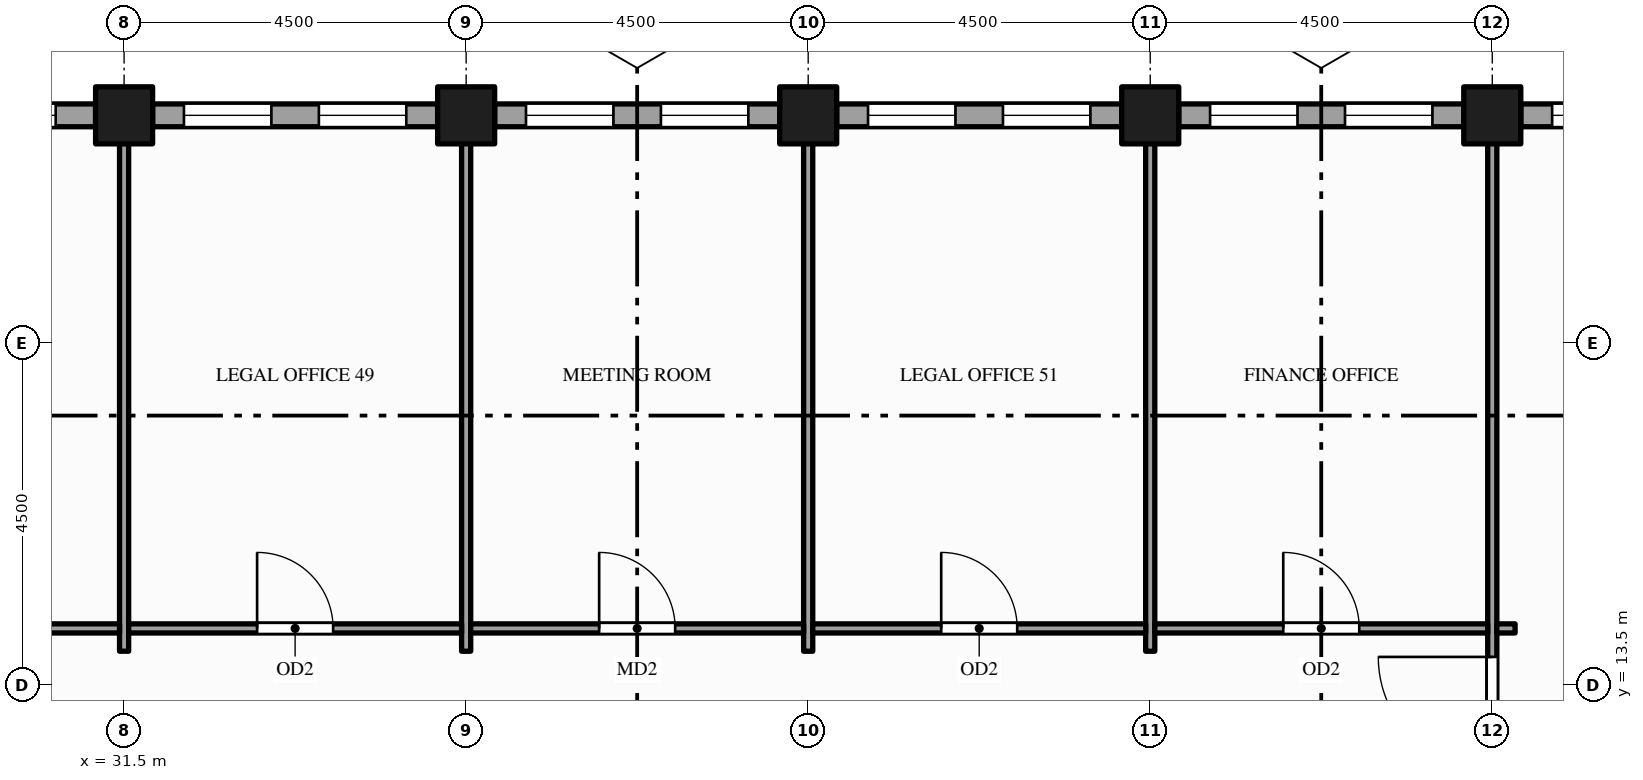
"""IFC4 building model, lengths in metres.
Left out: names, types, materials, properties, quantities, classifications, styles, units other than length and angle.
Written with IfcOpenShell. Run it as: python <this file> out.ifc"""

import sys

from ifc_helpers import new_model, si_unit, direction, frame, frame_2d, origin, origin_2d, place, context, subcontext, project, spatial, rectangle, hollow_rectangle, extrude, element, fill, save


model = new_model("IFC4")
c1 = context("Model", 3, precision=1e-05, world=origin(), true_north=direction((0.0, 1.0)))
c2 = subcontext(c1, "Body", "Model", "MODEL_VIEW")
j1 = project(units=[si_unit("LENGTHUNIT", "METRE"), si_unit("PLANEANGLEUNIT", "RADIAN")], contexts=[c1])
p1 = place(None, origin())
s1 = spatial("IfcSite", under=j1, at=p1, CompositionType="ELEMENT")
p2 = place(p1, origin())
s2 = spatial("IfcBuilding", under=s1, at=p2, CompositionType="ELEMENT")
p3 = place(p2, frame((0.0, 0.0, 239.0)))
s3 = spatial("IfcBuildingStorey", under=s2, at=p3, CompositionType="ELEMENT", Elevation=239.0)
for number, where, z_axis, x_axis in (
    (1, (31.5, 21.0, -0.15), (0.0, 0.0, 1.0), (1.0, 0.0, 0.0)),
    (2, (36.0, 21.0, -0.15), (0.0, 0.0, 1.0), (1.0, 0.0, 0.0)),
    (3, (40.5, 21.0, -0.15), (0.0, 0.0, 1.0), (1.0, 0.0, 0.0)),
    (4, (45.0, 21.0, -0.15), (0.0, 0.0, 1.0), (1.0, 0.0, 0.0)),
    (5, (49.5, 21.0, -0.15), (0.0, 0.0, 1.0), (1.0, 0.0, 0.0)),
):
    element("IfcColumn", number, at=place(p3, frame(where, z_axis=z_axis, x_axis=x_axis)), inside=s3, PredefinedType="COLUMN", context=c2, shape_type="SweptSolid", body=[
        extrude(hollow_rectangle(XDim=0.75, YDim=0.75, WallThickness=0.036, at=origin_2d()), origin(), (0.0, 0.0, 1.0), 3.9),
    ])
p4 = place(p3, frame((54.0, 21.0, 0.0), z_axis=(0.0, 0.0, 1.0), x_axis=(-1.0, 0.0, 0.0)))
e6 = element("IfcWall", 6, at=p4, inside=s3, PredefinedType="STANDARD", context=c2, shape_type="SweptSolid", body=[
    extrude(rectangle(XDim=4.125, YDim=0.3, at=frame_2d((2.062, 0.0))), origin(), (0.0, 0.0, 1.0), 2.77),
])
p5 = place(p4, frame((0.4, 0.0, 0.9)))
e7 = element("IfcOpeningElement", 7, at=p5, cuts=e6, PredefinedType="OPENING", context=c2, shape_type="SweptSolid", body=[
    extrude(rectangle(XDim=1.55, YDim=1.5, at=frame_2d((0.775, 0.75))), frame((0.0, 0.16, 0.0), z_axis=(0.0, -1.0, 0.0), x_axis=(1.0, 0.0, 0.0)), (0.0, 0.0, 1.0), 0.32),
])
p6 = place(p4, frame((2.562, 0.0, 0.9)))
e8 = element("IfcOpeningElement", 8, at=p6, cuts=e6, PredefinedType="OPENING", context=c2, shape_type="SweptSolid", body=[
    extrude(rectangle(XDim=1.15, YDim=1.5, at=frame_2d((0.575, 0.75))), frame((0.0, 0.16, 0.0), z_axis=(0.0, -1.0, 0.0), x_axis=(1.0, 0.0, 0.0)), (0.0, 0.0, 1.0), 0.32),
])
p7 = place(p3, frame((49.125, 21.0, 0.0), z_axis=(0.0, 0.0, 1.0), x_axis=(-1.0, 0.0, 0.0)))
e9 = element("IfcWall", 9, at=p7, inside=s3, PredefinedType="STANDARD", context=c2, shape_type="SweptSolid", body=[
    extrude(rectangle(XDim=3.75, YDim=0.3, at=frame_2d((1.875, 0.0))), origin(), (0.0, 0.0, 1.0), 2.77),
])
p8 = place(p7, frame((0.413, 0.0, 0.9)))
e10 = element("IfcOpeningElement", 10, at=p8, cuts=e9, PredefinedType="OPENING", context=c2, shape_type="SweptSolid", body=[
    extrude(rectangle(XDim=1.15, YDim=1.5, at=frame_2d((0.575, 0.75))), frame((0.0, 0.16, 0.0), z_axis=(0.0, -1.0, 0.0), x_axis=(1.0, 0.0, 0.0)), (0.0, 0.0, 1.0), 0.32),
])
p9 = place(p7, frame((2.188, 0.0, 0.9)))
e11 = element("IfcOpeningElement", 11, at=p9, cuts=e9, PredefinedType="OPENING", context=c2, shape_type="SweptSolid", body=[
    extrude(rectangle(XDim=1.15, YDim=1.5, at=frame_2d((0.575, 0.75))), frame((0.0, 0.16, 0.0), z_axis=(0.0, -1.0, 0.0), x_axis=(1.0, 0.0, 0.0)), (0.0, 0.0, 1.0), 0.32),
])
p10 = place(p3, frame((44.625, 21.0, 0.0), z_axis=(0.0, 0.0, 1.0), x_axis=(-1.0, 0.0, 0.0)))
e12 = element("IfcWall", 12, at=p10, inside=s3, PredefinedType="STANDARD", context=c2, shape_type="SweptSolid", body=[
    extrude(rectangle(XDim=3.75, YDim=0.3, at=frame_2d((1.875, 0.0))), origin(), (0.0, 0.0, 1.0), 2.77),
])
p11 = place(p10, frame((0.413, 0.0, 0.9)))
e13 = element("IfcOpeningElement", 13, at=p11, cuts=e12, PredefinedType="OPENING", context=c2, shape_type="SweptSolid", body=[
    extrude(rectangle(XDim=1.15, YDim=1.5, at=frame_2d((0.575, 0.75))), frame((0.0, 0.16, 0.0), z_axis=(0.0, -1.0, 0.0), x_axis=(1.0, 0.0, 0.0)), (0.0, 0.0, 1.0), 0.32),
])
p12 = place(p10, frame((2.188, 0.0, 0.9)))
e14 = element("IfcOpeningElement", 14, at=p12, cuts=e12, PredefinedType="OPENING", context=c2, shape_type="SweptSolid", body=[
    extrude(rectangle(XDim=1.15, YDim=1.5, at=frame_2d((0.575, 0.75))), frame((0.0, 0.16, 0.0), z_axis=(0.0, -1.0, 0.0), x_axis=(1.0, 0.0, 0.0)), (0.0, 0.0, 1.0), 0.32),
])
p13 = place(p3, frame((40.125, 21.0, 0.0), z_axis=(0.0, 0.0, 1.0), x_axis=(-1.0, 0.0, 0.0)))
e15 = element("IfcWall", 15, at=p13, inside=s3, PredefinedType="STANDARD", context=c2, shape_type="SweptSolid", body=[
    extrude(rectangle(XDim=3.75, YDim=0.3, at=frame_2d((1.875, 0.0))), origin(), (0.0, 0.0, 1.0), 2.77),
])
p14 = place(p13, frame((0.413, 0.0, 0.9)))
e16 = element("IfcOpeningElement", 16, at=p14, cuts=e15, PredefinedType="OPENING", context=c2, shape_type="SweptSolid", body=[
    extrude(rectangle(XDim=1.15, YDim=1.5, at=frame_2d((0.575, 0.75))), frame((0.0, 0.16, 0.0), z_axis=(0.0, -1.0, 0.0), x_axis=(1.0, 0.0, 0.0)), (0.0, 0.0, 1.0), 0.32),
])
p15 = place(p13, frame((2.188, 0.0, 0.9)))
e17 = element("IfcOpeningElement", 17, at=p15, cuts=e15, PredefinedType="OPENING", context=c2, shape_type="SweptSolid", body=[
    extrude(rectangle(XDim=1.15, YDim=1.5, at=frame_2d((0.575, 0.75))), frame((0.0, 0.16, 0.0), z_axis=(0.0, -1.0, 0.0), x_axis=(1.0, 0.0, 0.0)), (0.0, 0.0, 1.0), 0.32),
])
p16 = place(p3, frame((35.625, 21.0, 0.0), z_axis=(0.0, 0.0, 1.0), x_axis=(-1.0, 0.0, 0.0)))
e18 = element("IfcWall", 18, at=p16, inside=s3, PredefinedType="STANDARD", context=c2, shape_type="SweptSolid", body=[
    extrude(rectangle(XDim=3.75, YDim=0.3, at=frame_2d((1.875, 0.0))), origin(), (0.0, 0.0, 1.0), 2.77),
])
p17 = place(p16, frame((0.413, 0.0, 0.9)))
e19 = element("IfcOpeningElement", 19, at=p17, cuts=e18, PredefinedType="OPENING", context=c2, shape_type="SweptSolid", body=[
    extrude(rectangle(XDim=1.15, YDim=1.5, at=frame_2d((0.575, 0.75))), frame((0.0, 0.16, 0.0), z_axis=(0.0, -1.0, 0.0), x_axis=(1.0, 0.0, 0.0)), (0.0, 0.0, 1.0), 0.32),
])
p18 = place(p16, frame((2.188, 0.0, 0.9)))
e20 = element("IfcOpeningElement", 20, at=p18, cuts=e18, PredefinedType="OPENING", context=c2, shape_type="SweptSolid", body=[
    extrude(rectangle(XDim=1.15, YDim=1.5, at=frame_2d((0.575, 0.75))), frame((0.0, 0.16, 0.0), z_axis=(0.0, -1.0, 0.0), x_axis=(1.0, 0.0, 0.0)), (0.0, 0.0, 1.0), 0.32),
])
p19 = place(p3, frame((31.125, 21.0, 0.0), z_axis=(0.0, 0.0, 1.0), x_axis=(-1.0, 0.0, 0.0)))
e21 = element("IfcWall", 21, at=p19, inside=s3, PredefinedType="STANDARD", context=c2, shape_type="SweptSolid", body=[
    extrude(rectangle(XDim=2.25, YDim=0.3, at=frame_2d((1.125, 0.0))), origin(), (0.0, 0.0, 1.0), 2.77),
])
p20 = place(p19, frame((0.525, 0.0, 0.9)))
e22 = element("IfcOpeningElement", 22, at=p20, cuts=e21, PredefinedType="OPENING", context=c2, shape_type="SweptSolid", body=[
    extrude(rectangle(XDim=1.2, YDim=1.5, at=frame_2d((0.6, 0.75))), frame((0.0, 0.16, 0.0), z_axis=(0.0, -1.0, 0.0), x_axis=(1.0, 0.0, 0.0)), (0.0, 0.0, 1.0), 0.32),
])
for number, where, z_axis, x_axis in (
    (23, (31.5, 13.95, 0.0), (0.0, 0.0, 1.0), (0.0, 1.0, 0.0)),
    (24, (36.0, 13.95, 0.0), (0.0, 0.0, 1.0), (0.0, 1.0, 0.0)),
    (25, (40.5, 13.95, 0.0), (0.0, 0.0, 1.0), (0.0, 1.0, 0.0)),
    (26, (45.0, 13.95, 0.0), (0.0, 0.0, 1.0), (0.0, 1.0, 0.0)),
):
    element("IfcWall", number, at=place(p3, frame(where, z_axis=z_axis, x_axis=x_axis)), inside=s3, PredefinedType="PARTITIONING", context=c2, shape_type="SweptSolid", body=[
        extrude(rectangle(XDim=6.9, YDim=0.12, at=frame_2d((3.45, 0.0))), origin(), (0.0, 0.0, 1.0), 2.77),
    ])
p21 = place(p3, frame((49.5, -1.35, 0.0), z_axis=(0.0, 0.0, 1.0), x_axis=(0.0, 1.0, 0.0)))
e27 = element("IfcWall", 27, at=p21, inside=s3, PredefinedType="PARTITIONING", context=c2, shape_type="SweptSolid", body=[
    extrude(rectangle(XDim=22.2, YDim=0.12, at=frame_2d((11.1, 0.0))), origin(), (0.0, 0.0, 1.0), 2.3),
])
p22 = place(p21, frame((6.975, 0.0, 0.0)))
e28 = element("IfcOpeningElement", 28, at=p22, cuts=e27, PredefinedType="OPENING", context=c2, shape_type="SweptSolid", body=[
    extrude(rectangle(XDim=1.5, YDim=2.1, at=frame_2d((0.75, 1.05))), frame((0.0, 0.07, 0.0), z_axis=(0.0, -1.0, 0.0), x_axis=(1.0, 0.0, 0.0)), (0.0, 0.0, 1.0), 0.14),
])
p23 = place(p21, frame((13.725, 0.0, 0.0)))
e29 = element("IfcOpeningElement", 29, at=p23, cuts=e27, PredefinedType="OPENING", context=c2, shape_type="SweptSolid", body=[
    extrude(rectangle(XDim=1.5, YDim=2.1, at=frame_2d((0.75, 1.05))), frame((0.0, 0.07, 0.0), z_axis=(0.0, -1.0, 0.0), x_axis=(1.0, 0.0, 0.0)), (0.0, 0.0, 1.0), 0.14),
])
p24 = place(p21, frame((9.29, 0.0, 0.0)))
e30 = element("IfcOpeningElement", 30, at=p24, cuts=e27, PredefinedType="OPENING", context=c2, shape_type="SweptSolid", body=[
    extrude(rectangle(XDim=0.9, YDim=2.1, at=frame_2d((0.45, 1.05))), frame((0.0, 0.07, 0.0), z_axis=(0.0, -1.0, 0.0), x_axis=(1.0, 0.0, 0.0)), (0.0, 0.0, 1.0), 0.14),
])
p25 = place(p21, frame((10.65, 0.0, 0.0)))
e31 = element("IfcOpeningElement", 31, at=p25, cuts=e27, PredefinedType="OPENING", context=c2, shape_type="SweptSolid", body=[
    extrude(rectangle(XDim=0.9, YDim=2.1, at=frame_2d((0.45, 1.05))), frame((0.0, 0.07, 0.0), z_axis=(0.0, -1.0, 0.0), x_axis=(1.0, 0.0, 0.0)), (0.0, 0.0, 1.0), 0.14),
])
p26 = place(p21, frame((12.01, 0.0, 0.0)))
e32 = element("IfcOpeningElement", 32, at=p26, cuts=e27, PredefinedType="OPENING", context=c2, shape_type="SweptSolid", body=[
    extrude(rectangle(XDim=1.0, YDim=2.1, at=frame_2d((0.5, 1.05))), frame((0.0, 0.07, 0.0), z_axis=(0.0, -1.0, 0.0), x_axis=(1.0, 0.0, 0.0)), (0.0, 0.0, 1.0), 0.14),
])
p27 = place(p3, frame((27.06, 14.25, 0.0), z_axis=(0.0, 0.0, 1.0), x_axis=(1.0, 0.0, 0.0)))
e33 = element("IfcWall", 33, at=p27, inside=s3, PredefinedType="PARTITIONING", context=c2, shape_type="SweptSolid", body=[
    extrude(rectangle(XDim=4.38, YDim=0.12, at=frame_2d((2.19, 0.0))), origin(), (0.0, 0.0, 1.0), 2.77),
])
p28 = place(p27, frame((1.69, 0.0, 0.0)))
e34 = element("IfcOpeningElement", 34, at=p28, cuts=e33, PredefinedType="OPENING", context=c2, shape_type="SweptSolid", body=[
    extrude(rectangle(XDim=1.0, YDim=2.1, at=frame_2d((0.5, 1.05))), frame((0.0, 0.07, 0.0), z_axis=(0.0, -1.0, 0.0), x_axis=(1.0, 0.0, 0.0)), (0.0, 0.0, 1.0), 0.14),
])
p29 = place(p3, frame((31.56, 14.25, 0.0), z_axis=(0.0, 0.0, 1.0), x_axis=(1.0, 0.0, 0.0)))
e35 = element("IfcWall", 35, at=p29, inside=s3, PredefinedType="PARTITIONING", context=c2, shape_type="SweptSolid", body=[
    extrude(rectangle(XDim=4.38, YDim=0.12, at=frame_2d((2.19, 0.0))), origin(), (0.0, 0.0, 1.0), 2.77),
])
p30 = place(p29, frame((1.69, 0.0, 0.0)))
e36 = element("IfcOpeningElement", 36, at=p30, cuts=e35, PredefinedType="OPENING", context=c2, shape_type="SweptSolid", body=[
    extrude(rectangle(XDim=1.0, YDim=2.1, at=frame_2d((0.5, 1.05))), frame((0.0, 0.07, 0.0), z_axis=(0.0, -1.0, 0.0), x_axis=(1.0, 0.0, 0.0)), (0.0, 0.0, 1.0), 0.14),
])
p31 = place(p3, frame((36.06, 14.25, 0.0), z_axis=(0.0, 0.0, 1.0), x_axis=(1.0, 0.0, 0.0)))
e37 = element("IfcWall", 37, at=p31, inside=s3, PredefinedType="PARTITIONING", context=c2, shape_type="SweptSolid", body=[
    extrude(rectangle(XDim=4.38, YDim=0.12, at=frame_2d((2.19, 0.0))), origin(), (0.0, 0.0, 1.0), 2.77),
])
p32 = place(p31, frame((1.69, 0.0, 0.0)))
e38 = element("IfcOpeningElement", 38, at=p32, cuts=e37, PredefinedType="OPENING", context=c2, shape_type="SweptSolid", body=[
    extrude(rectangle(XDim=1.0, YDim=2.1, at=frame_2d((0.5, 1.05))), frame((0.0, 0.07, 0.0), z_axis=(0.0, -1.0, 0.0), x_axis=(1.0, 0.0, 0.0)), (0.0, 0.0, 1.0), 0.14),
])
p33 = place(p3, frame((40.56, 14.25, 0.0), z_axis=(0.0, 0.0, 1.0), x_axis=(1.0, 0.0, 0.0)))
e39 = element("IfcWall", 39, at=p33, inside=s3, PredefinedType="PARTITIONING", context=c2, shape_type="SweptSolid", body=[
    extrude(rectangle(XDim=4.38, YDim=0.12, at=frame_2d((2.19, 0.0))), origin(), (0.0, 0.0, 1.0), 2.77),
])
p34 = place(p33, frame((1.69, 0.0, 0.0)))
e40 = element("IfcOpeningElement", 40, at=p34, cuts=e39, PredefinedType="OPENING", context=c2, shape_type="SweptSolid", body=[
    extrude(rectangle(XDim=1.0, YDim=2.1, at=frame_2d((0.5, 1.05))), frame((0.0, 0.07, 0.0), z_axis=(0.0, -1.0, 0.0), x_axis=(1.0, 0.0, 0.0)), (0.0, 0.0, 1.0), 0.14),
])
p35 = place(p3, frame((45.06, 14.25, 0.0), z_axis=(0.0, 0.0, 1.0), x_axis=(1.0, 0.0, 0.0)))
e41 = element("IfcWall", 41, at=p35, inside=s3, PredefinedType="PARTITIONING", context=c2, shape_type="SweptSolid", body=[
    extrude(rectangle(XDim=4.38, YDim=0.12, at=frame_2d((2.19, 0.0))), origin(), (0.0, 0.0, 1.0), 2.77),
])
p36 = place(p35, frame((1.69, 0.0, 0.0)))
e42 = element("IfcOpeningElement", 42, at=p36, cuts=e41, PredefinedType="OPENING", context=c2, shape_type="SweptSolid", body=[
    extrude(rectangle(XDim=1.0, YDim=2.1, at=frame_2d((0.5, 1.05))), frame((0.0, 0.07, 0.0), z_axis=(0.0, -1.0, 0.0), x_axis=(1.0, 0.0, 0.0)), (0.0, 0.0, 1.0), 0.14),
])
p37 = place(p3, frame((49.56, 14.25, 0.0), z_axis=(0.0, 0.0, 1.0), x_axis=(1.0, 0.0, 0.0)))
e43 = element("IfcWall", 43, at=p37, inside=s3, PredefinedType="PARTITIONING", context=c2, shape_type="SweptSolid", body=[
    extrude(rectangle(XDim=0.24, YDim=0.12, at=frame_2d((0.12, 0.0))), origin(), (0.0, 0.0, 1.0), 2.77),
])
p38 = place(p6, origin())
e44 = element("IfcWindow", 44, at=p38, inside=s3, PartitioningType="SINGLE_PANEL", PredefinedType="WINDOW", context=c2, shape_type="SweptSolid", body=[
    extrude(rectangle(XDim=1.15, YDim=1.5, at=frame_2d((0.575, 0.75))), frame((0.0, 0.03, 0.0), z_axis=(0.0, -1.0, 0.0), x_axis=(1.0, 0.0, 0.0)), (0.0, 0.0, 1.0), 0.06),
])
fill(e8, e44)
p39 = place(p8, origin())
e45 = element("IfcWindow", 45, at=p39, inside=s3, PartitioningType="SINGLE_PANEL", PredefinedType="WINDOW", context=c2, shape_type="SweptSolid", body=[
    extrude(rectangle(XDim=1.15, YDim=1.5, at=frame_2d((0.575, 0.75))), frame((0.0, 0.03, 0.0), z_axis=(0.0, -1.0, 0.0), x_axis=(1.0, 0.0, 0.0)), (0.0, 0.0, 1.0), 0.06),
])
fill(e10, e45)
p40 = place(p9, origin())
e46 = element("IfcWindow", 46, at=p40, inside=s3, PartitioningType="SINGLE_PANEL", PredefinedType="WINDOW", context=c2, shape_type="SweptSolid", body=[
    extrude(rectangle(XDim=1.15, YDim=1.5, at=frame_2d((0.575, 0.75))), frame((0.0, 0.03, 0.0), z_axis=(0.0, -1.0, 0.0), x_axis=(1.0, 0.0, 0.0)), (0.0, 0.0, 1.0), 0.06),
])
fill(e11, e46)
p41 = place(p11, origin())
e47 = element("IfcWindow", 47, at=p41, inside=s3, PartitioningType="SINGLE_PANEL", PredefinedType="WINDOW", context=c2, shape_type="SweptSolid", body=[
    extrude(rectangle(XDim=1.15, YDim=1.5, at=frame_2d((0.575, 0.75))), frame((0.0, 0.03, 0.0), z_axis=(0.0, -1.0, 0.0), x_axis=(1.0, 0.0, 0.0)), (0.0, 0.0, 1.0), 0.06),
])
fill(e13, e47)
p42 = place(p12, origin())
e48 = element("IfcWindow", 48, at=p42, inside=s3, PartitioningType="SINGLE_PANEL", PredefinedType="WINDOW", context=c2, shape_type="SweptSolid", body=[
    extrude(rectangle(XDim=1.15, YDim=1.5, at=frame_2d((0.575, 0.75))), frame((0.0, 0.03, 0.0), z_axis=(0.0, -1.0, 0.0), x_axis=(1.0, 0.0, 0.0)), (0.0, 0.0, 1.0), 0.06),
])
fill(e14, e48)
p43 = place(p14, origin())
e49 = element("IfcWindow", 49, at=p43, inside=s3, PartitioningType="SINGLE_PANEL", PredefinedType="WINDOW", context=c2, shape_type="SweptSolid", body=[
    extrude(rectangle(XDim=1.15, YDim=1.5, at=frame_2d((0.575, 0.75))), frame((0.0, 0.03, 0.0), z_axis=(0.0, -1.0, 0.0), x_axis=(1.0, 0.0, 0.0)), (0.0, 0.0, 1.0), 0.06),
])
fill(e16, e49)
p44 = place(p15, origin())
e50 = element("IfcWindow", 50, at=p44, inside=s3, PartitioningType="SINGLE_PANEL", PredefinedType="WINDOW", context=c2, shape_type="SweptSolid", body=[
    extrude(rectangle(XDim=1.15, YDim=1.5, at=frame_2d((0.575, 0.75))), frame((0.0, 0.03, 0.0), z_axis=(0.0, -1.0, 0.0), x_axis=(1.0, 0.0, 0.0)), (0.0, 0.0, 1.0), 0.06),
])
fill(e17, e50)
p45 = place(p17, origin())
e51 = element("IfcWindow", 51, at=p45, inside=s3, PartitioningType="SINGLE_PANEL", PredefinedType="WINDOW", context=c2, shape_type="SweptSolid", body=[
    extrude(rectangle(XDim=1.15, YDim=1.5, at=frame_2d((0.575, 0.75))), frame((0.0, 0.03, 0.0), z_axis=(0.0, -1.0, 0.0), x_axis=(1.0, 0.0, 0.0)), (0.0, 0.0, 1.0), 0.06),
])
fill(e19, e51)
p46 = place(p18, origin())
e52 = element("IfcWindow", 52, at=p46, inside=s3, PartitioningType="SINGLE_PANEL", PredefinedType="WINDOW", context=c2, shape_type="SweptSolid", body=[
    extrude(rectangle(XDim=1.15, YDim=1.5, at=frame_2d((0.575, 0.75))), frame((0.0, 0.03, 0.0), z_axis=(0.0, -1.0, 0.0), x_axis=(1.0, 0.0, 0.0)), (0.0, 0.0, 1.0), 0.06),
])
fill(e20, e52)
p47 = place(p20, origin())
e53 = element("IfcWindow", 53, at=p47, inside=s3, PartitioningType="SINGLE_PANEL", PredefinedType="WINDOW", context=c2, shape_type="SweptSolid", body=[
    extrude(rectangle(XDim=1.2, YDim=1.5, at=frame_2d((0.6, 0.75))), frame((0.0, 0.03, 0.0), z_axis=(0.0, -1.0, 0.0), x_axis=(1.0, 0.0, 0.0)), (0.0, 0.0, 1.0), 0.06),
])
fill(e22, e53)
p48 = place(p23, origin())
e54 = element("IfcDoor", 54, at=p48, inside=s3, OperationType="SINGLE_SWING_RIGHT", PredefinedType="DOOR", context=c2, shape_type="SweptSolid", body=[
    extrude(rectangle(XDim=1.5, YDim=2.1, at=frame_2d((0.75, 1.05))), frame((0.0, 0.025, 0.0), z_axis=(0.0, -1.0, 0.0), x_axis=(1.0, 0.0, 0.0)), (0.0, 0.0, 1.0), 0.05),
])
fill(e29, e54)
p49 = place(p30, origin())
e55 = element("IfcDoor", 55, at=p49, inside=s3, OperationType="SINGLE_SWING_LEFT", PredefinedType="DOOR", context=c2, shape_type="SweptSolid", body=[
    extrude(rectangle(XDim=1.0, YDim=2.1, at=frame_2d((0.5, 1.05))), frame((0.0, 0.025, 0.0), z_axis=(0.0, -1.0, 0.0), x_axis=(1.0, 0.0, 0.0)), (0.0, 0.0, 1.0), 0.05),
])
fill(e36, e55)
p50 = place(p32, origin())
e56 = element("IfcDoor", 56, at=p50, inside=s3, OperationType="SINGLE_SWING_LEFT", PredefinedType="DOOR", context=c2, shape_type="SweptSolid", body=[
    extrude(rectangle(XDim=1.0, YDim=2.1, at=frame_2d((0.5, 1.05))), frame((0.0, 0.025, 0.0), z_axis=(0.0, -1.0, 0.0), x_axis=(1.0, 0.0, 0.0)), (0.0, 0.0, 1.0), 0.05),
])
fill(e38, e56)
p51 = place(p34, origin())
e57 = element("IfcDoor", 57, at=p51, inside=s3, OperationType="SINGLE_SWING_LEFT", PredefinedType="DOOR", context=c2, shape_type="SweptSolid", body=[
    extrude(rectangle(XDim=1.0, YDim=2.1, at=frame_2d((0.5, 1.05))), frame((0.0, 0.025, 0.0), z_axis=(0.0, -1.0, 0.0), x_axis=(1.0, 0.0, 0.0)), (0.0, 0.0, 1.0), 0.05),
])
fill(e40, e57)
p52 = place(p36, origin())
e58 = element("IfcDoor", 58, at=p52, inside=s3, OperationType="SINGLE_SWING_LEFT", PredefinedType="DOOR", context=c2, shape_type="SweptSolid", body=[
    extrude(rectangle(XDim=1.0, YDim=2.1, at=frame_2d((0.5, 1.05))), frame((0.0, 0.025, 0.0), z_axis=(0.0, -1.0, 0.0), x_axis=(1.0, 0.0, 0.0)), (0.0, 0.0, 1.0), 0.05),
])
fill(e42, e58)
save(model, sys.argv[1])
